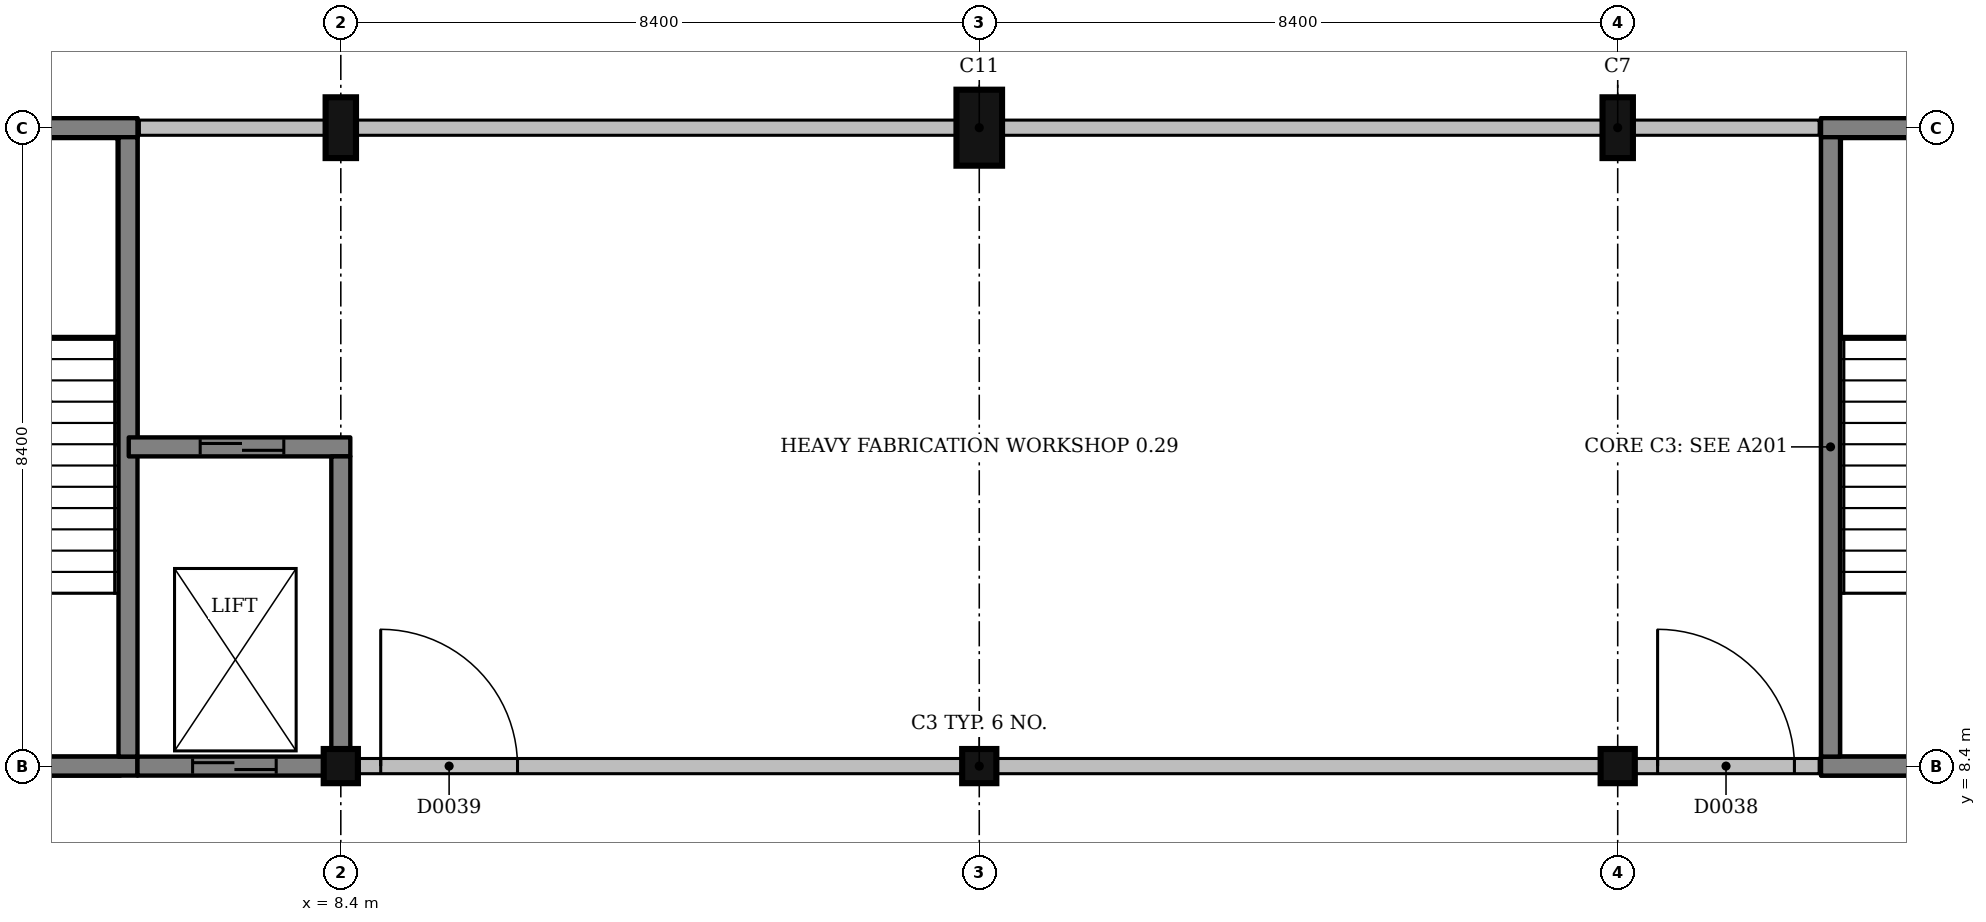
"""IFC4 building model, lengths in metres.
Left out: names, types, materials, properties, quantities, classifications, styles, units other than length and angle.
Written with IfcOpenShell. Run it as: python <this file> out.ifc"""

import sys

from ifc_helpers import new_model, si_unit, direction, frame, frame_2d, origin, origin_2d, place, context, subcontext, project, spatial, rectangle, extrude, element, fill, save


model = new_model("IFC4")
c1 = context("Model", 3, precision=1e-05, world=origin(), true_north=direction((0.0, 1.0)))
c2 = subcontext(c1, "Body", "Model", "MODEL_VIEW")
j1 = project(units=[si_unit("LENGTHUNIT", "METRE"), si_unit("PLANEANGLEUNIT", "RADIAN")], contexts=[c1])
p1 = place(None, origin())
s1 = spatial("IfcSite", under=j1, at=p1, CompositionType="ELEMENT")
p2 = place(p1, origin())
s2 = spatial("IfcBuilding", under=s1, at=p2, CompositionType="ELEMENT")
p3 = place(p2, origin())
s3 = spatial("IfcBuildingStorey", under=s2, at=p3, CompositionType="ELEMENT", Elevation=0.0)
p4 = place(p3, frame((8.4, 8.4, -1.5), z_axis=(0.0, 0.0, 1.0), x_axis=(1.0, 0.0, 0.0)))
e1 = element("IfcColumn", 1, at=p4, inside=s3, PredefinedType="COLUMN", context=c2, shape_type="SweptSolid", body=[
    extrude(rectangle(XDim=0.45, YDim=0.45, at=origin_2d()), origin(), (0.0, 0.0, 1.0), 6.0),
])
p5 = place(p3, frame((8.4, 16.8, -1.5), z_axis=(0.0, 0.0, 1.0), x_axis=(1.0, 0.0, 0.0)))
e2 = element("IfcColumn", 2, at=p5, inside=s3, PredefinedType="COLUMN", context=c2, shape_type="SweptSolid", body=[
    extrude(rectangle(XDim=0.4, YDim=0.8, at=origin_2d()), origin(), (0.0, 0.0, 1.0), 6.0),
])
p6 = place(p3, frame((16.8, 8.4, -1.5), z_axis=(0.0, 0.0, 1.0), x_axis=(1.0, 0.0, 0.0)))
e3 = element("IfcColumn", 3, at=p6, inside=s3, PredefinedType="COLUMN", context=c2, shape_type="SweptSolid", body=[
    extrude(rectangle(XDim=0.45, YDim=0.45, at=origin_2d()), origin(), (0.0, 0.0, 1.0), 6.0),
])
p7 = place(p3, frame((16.8, 16.8, -1.5), z_axis=(0.0, 0.0, 1.0), x_axis=(1.0, 0.0, 0.0)))
e4 = element("IfcColumn", 4, at=p7, inside=s3, PredefinedType="COLUMN", context=c2, shape_type="SweptSolid", body=[
    extrude(rectangle(XDim=0.6, YDim=1.0, at=origin_2d()), origin(), (0.0, 0.0, 1.0), 6.0),
])
p8 = place(p3, frame((25.2, 8.4, -1.5), z_axis=(0.0, 0.0, 1.0), x_axis=(1.0, 0.0, 0.0)))
e5 = element("IfcColumn", 5, at=p8, inside=s3, PredefinedType="COLUMN", context=c2, shape_type="SweptSolid", body=[
    extrude(rectangle(XDim=0.45, YDim=0.45, at=origin_2d()), origin(), (0.0, 0.0, 1.0), 6.0),
])
p9 = place(p3, frame((25.2, 16.8, -1.5), z_axis=(0.0, 0.0, 1.0), x_axis=(1.0, 0.0, 0.0)))
e6 = element("IfcColumn", 6, at=p9, inside=s3, PredefinedType="COLUMN", context=c2, shape_type="SweptSolid", body=[
    extrude(rectangle(XDim=0.4, YDim=0.8, at=origin_2d()), origin(), (0.0, 0.0, 1.0), 6.0),
])
p10 = place(p3, frame((5.5, 8.4, 0.0), z_axis=(0.0, 0.0, 1.0), x_axis=(1.0, 0.0, 0.0)))
e7 = element("IfcWall", 7, at=p10, inside=s3, PredefinedType="SHEAR", context=c2, shape_type="SweptSolid", body=[
    extrude(rectangle(XDim=2.675, YDim=0.2, at=frame_2d((1.337, 0.0))), origin(), (0.0, 0.0, 1.0), 4.5),
])
p11 = place(p10, frame((0.95, 0.0, 0.0)))
e8 = element("IfcOpeningElement", 8, at=p11, cuts=e7, PredefinedType="OPENING", context=c2, shape_type="SweptSolid", body=[
    extrude(rectangle(XDim=1.1, YDim=2.1, at=frame_2d((0.55, 1.05))), frame((0.0, 0.11, 0.0), z_axis=(0.0, -1.0, 0.0), x_axis=(1.0, 0.0, 0.0)), (0.0, 0.0, 1.0), 0.22),
])
p12 = place(p3, frame((5.5, 12.6, 0.0), z_axis=(0.0, 0.0, 1.0), x_axis=(1.0, 0.0, 0.0)))
e9 = element("IfcWall", 9, at=p12, inside=s3, PredefinedType="SHEAR", context=c2, shape_type="SweptSolid", body=[
    extrude(rectangle(XDim=3.0, YDim=0.2, at=frame_2d((1.5, 0.0))), origin(), (0.0, 0.0, 1.0), 4.5),
])
p13 = place(p12, frame((1.05, 0.0, 0.0)))
e10 = element("IfcOpeningElement", 10, at=p13, cuts=e9, PredefinedType="OPENING", context=c2, shape_type="SweptSolid", body=[
    extrude(rectangle(XDim=1.1, YDim=2.1, at=frame_2d((0.55, 1.05))), frame((0.0, 0.11, 0.0), z_axis=(0.0, -1.0, 0.0), x_axis=(1.0, 0.0, 0.0)), (0.0, 0.0, 1.0), 0.22),
])
p14 = place(p3, frame((5.6, 8.5, 0.0), z_axis=(0.0, 0.0, 1.0), x_axis=(0.0, 1.0, 0.0)))
e11 = element("IfcWall", 11, at=p14, inside=s3, PredefinedType="SHEAR", context=c2, shape_type="SweptSolid", body=[
    extrude(rectangle(XDim=4.0, YDim=0.2, at=frame_2d((2.0, 0.0))), origin(), (0.0, 0.0, 1.0), 4.5),
])
p15 = place(p3, frame((8.4, 8.625, 0.0), z_axis=(0.0, 0.0, 1.0), x_axis=(0.0, 1.0, 0.0)))
e12 = element("IfcWall", 12, at=p15, inside=s3, PredefinedType="SHEAR", context=c2, shape_type="SweptSolid", body=[
    extrude(rectangle(XDim=3.875, YDim=0.2, at=frame_2d((1.938, 0.0))), origin(), (0.0, 0.0, 1.0), 4.5),
])
p16 = place(p3, frame((0.2, 8.4, 0.0), z_axis=(0.0, 0.0, 1.0), x_axis=(1.0, 0.0, 0.0)))
e13 = element("IfcWall", 13, at=p16, inside=s3, PredefinedType="SHEAR", context=c2, shape_type="SweptSolid", body=[
    extrude(rectangle(XDim=5.3, YDim=0.25, at=frame_2d((2.65, 0.0))), origin(), (0.0, 0.0, 1.0), 4.5),
])
p17 = place(p16, frame((2.125, 0.0, 0.0)))
e14 = element("IfcOpeningElement", 14, at=p17, cuts=e13, PredefinedType="OPENING", context=c2, shape_type="SweptSolid", body=[
    extrude(rectangle(XDim=1.0, YDim=2.1, at=frame_2d((0.5, 1.05))), frame((0.0, 0.135, 0.0), z_axis=(0.0, -1.0, 0.0), x_axis=(1.0, 0.0, 0.0)), (0.0, 0.0, 1.0), 0.27),
])
p18 = place(p3, frame((0.3, 16.8, 0.0), z_axis=(0.0, 0.0, 1.0), x_axis=(1.0, 0.0, 0.0)))
e15 = element("IfcWall", 15, at=p18, inside=s3, PredefinedType="SHEAR", context=c2, shape_type="SweptSolid", body=[
    extrude(rectangle(XDim=5.425, YDim=0.25, at=frame_2d((2.712, 0.0))), origin(), (0.0, 0.0, 1.0), 4.5),
])
p19 = place(p3, frame((5.6, 12.61, 0.0), z_axis=(0.0, 0.0, 1.0), x_axis=(0.0, 1.0, 0.0)))
e16 = element("IfcWall", 16, at=p19, inside=s3, PredefinedType="SHEAR", context=c2, shape_type="SweptSolid", body=[
    extrude(rectangle(XDim=4.065, YDim=0.25, at=frame_2d((2.032, 0.0))), origin(), (0.0, 0.0, 1.0), 4.5),
])
p20 = place(p3, frame((27.875, 8.4, 0.0), z_axis=(0.0, 0.0, 1.0), x_axis=(1.0, 0.0, 0.0)))
e17 = element("IfcWall", 17, at=p20, inside=s3, PredefinedType="SHEAR", context=c2, shape_type="SweptSolid", body=[
    extrude(rectangle(XDim=5.5, YDim=0.25, at=frame_2d((2.75, 0.0))), origin(), (0.0, 0.0, 1.0), 4.5),
])
p21 = place(p20, frame((2.45, 0.0, 0.0)))
e18 = element("IfcOpeningElement", 18, at=p21, cuts=e17, PredefinedType="OPENING", context=c2, shape_type="SweptSolid", body=[
    extrude(rectangle(XDim=1.0, YDim=2.1, at=frame_2d((0.5, 1.05))), frame((0.0, 0.135, 0.0), z_axis=(0.0, -1.0, 0.0), x_axis=(1.0, 0.0, 0.0)), (0.0, 0.0, 1.0), 0.27),
])
p22 = place(p3, frame((27.875, 16.8, 0.0), z_axis=(0.0, 0.0, 1.0), x_axis=(1.0, 0.0, 0.0)))
e19 = element("IfcWall", 19, at=p22, inside=s3, PredefinedType="SHEAR", context=c2, shape_type="SweptSolid", body=[
    extrude(rectangle(XDim=5.425, YDim=0.25, at=frame_2d((2.712, 0.0))), origin(), (0.0, 0.0, 1.0), 4.5),
])
p23 = place(p3, frame((28.0, 8.525, 0.0), z_axis=(0.0, 0.0, 1.0), x_axis=(0.0, 1.0, 0.0)))
e20 = element("IfcWall", 20, at=p23, inside=s3, PredefinedType="SHEAR", context=c2, shape_type="SweptSolid", body=[
    extrude(rectangle(XDim=8.15, YDim=0.25, at=frame_2d((4.075, 0.0))), origin(), (0.0, 0.0, 1.0), 4.5),
])
for number, where, z_axis, x_axis in (
    (21, (-0.125, 8.4, -1.5), (0.0, 0.0, 1.0), (1.0, 0.0, 0.0)),
    (22, (-0.125, 16.8, -1.5), (0.0, 0.0, 1.0), (1.0, 0.0, 0.0)),
):
    element("IfcWall", number, at=place(p3, frame(where, z_axis=z_axis, x_axis=x_axis)), inside=s3, PredefinedType="SHEAR", context=c2, shape_type="SweptSolid", body=[
        extrude(rectangle(XDim=5.85, YDim=0.25, at=frame_2d((2.925, 0.0))), origin(), (0.0, 0.0, 1.0), 1.5),
    ])
p24 = place(p3, frame((5.6, 8.525, -1.5), z_axis=(0.0, 0.0, 1.0), x_axis=(0.0, 1.0, 0.0)))
e23 = element("IfcWall", 23, at=p24, inside=s3, PredefinedType="SHEAR", context=c2, shape_type="SweptSolid", body=[
    extrude(rectangle(XDim=8.15, YDim=0.25, at=frame_2d((4.075, 0.0))), origin(), (0.0, 0.0, 1.0), 1.5),
])
for number, where, z_axis, x_axis in (
    (24, (27.875, 8.4, -1.5), (0.0, 0.0, 1.0), (1.0, 0.0, 0.0)),
    (25, (27.875, 16.8, -1.5), (0.0, 0.0, 1.0), (1.0, 0.0, 0.0)),
):
    element("IfcWall", number, at=place(p3, frame(where, z_axis=z_axis, x_axis=x_axis)), inside=s3, PredefinedType="SHEAR", context=c2, shape_type="SweptSolid", body=[
        extrude(rectangle(XDim=5.85, YDim=0.25, at=frame_2d((2.925, 0.0))), origin(), (0.0, 0.0, 1.0), 1.5),
    ])
p25 = place(p3, frame((28.0, 8.525, -1.5), z_axis=(0.0, 0.0, 1.0), x_axis=(0.0, 1.0, 0.0)))
e26 = element("IfcWall", 26, at=p25, inside=s3, PredefinedType="SHEAR", context=c2, shape_type="SweptSolid", body=[
    extrude(rectangle(XDim=8.15, YDim=0.25, at=frame_2d((4.075, 0.0))), origin(), (0.0, 0.0, 1.0), 1.5),
])
p26 = place(p3, frame((5.725, 8.4, -1.5), z_axis=(0.0, 0.0, 1.0), x_axis=(1.0, 0.0, 0.0)))
e27 = element("IfcWall", 27, at=p26, inside=s3, PredefinedType="SHEAR", context=c2, shape_type="SweptSolid", body=[
    extrude(rectangle(XDim=2.8, YDim=0.25, at=frame_2d((1.4, 0.0))), origin(), (0.0, 0.0, 1.0), 1.5),
])
p27 = place(p3, frame((5.61, 12.6, -1.5), z_axis=(0.0, 0.0, 1.0), x_axis=(1.0, 0.0, 0.0)))
e28 = element("IfcWall", 28, at=p27, inside=s3, PredefinedType="SHEAR", context=c2, shape_type="SweptSolid", body=[
    extrude(rectangle(XDim=2.915, YDim=0.25, at=frame_2d((1.458, 0.0))), origin(), (0.0, 0.0, 1.0), 1.5),
])
p28 = place(p3, frame((8.4, 8.525, -1.5), z_axis=(0.0, 0.0, 1.0), x_axis=(0.0, 1.0, 0.0)))
e29 = element("IfcWall", 29, at=p28, inside=s3, PredefinedType="SHEAR", context=c2, shape_type="SweptSolid", body=[
    extrude(rectangle(XDim=3.95, YDim=0.25, at=frame_2d((1.975, 0.0))), origin(), (0.0, 0.0, 1.0), 1.5),
])
p29 = place(p3, frame((8.625, 8.4, 0.0), z_axis=(0.0, 0.0, 1.0), x_axis=(1.0, 0.0, 0.0)))
e30 = element("IfcWall", 30, at=p29, inside=s3, PredefinedType="PARTITIONING", context=c2, shape_type="SweptSolid", body=[
    extrude(rectangle(XDim=7.95, YDim=0.2, at=frame_2d((3.975, 0.0))), origin(), (0.0, 0.0, 1.0), 3.5),
])
p30 = place(p29, frame((0.3, 0.0, 0.0)))
e31 = element("IfcOpeningElement", 31, at=p30, cuts=e30, PredefinedType="OPENING", context=c2, shape_type="SweptSolid", body=[
    extrude(rectangle(XDim=1.8, YDim=2.1, at=frame_2d((0.9, 1.05))), frame((0.0, 0.11, 0.0), z_axis=(0.0, -1.0, 0.0), x_axis=(1.0, 0.0, 0.0)), (0.0, 0.0, 1.0), 0.22),
])
p31 = place(p3, frame((17.025, 8.4, 0.0), z_axis=(0.0, 0.0, 1.0), x_axis=(1.0, 0.0, 0.0)))
e32 = element("IfcWall", 32, at=p31, inside=s3, PredefinedType="PARTITIONING", context=c2, shape_type="SweptSolid", body=[
    extrude(rectangle(XDim=7.95, YDim=0.2, at=frame_2d((3.975, 0.0))), origin(), (0.0, 0.0, 1.0), 3.5),
])
p32 = place(p3, frame((25.425, 8.4, 0.0), z_axis=(0.0, 0.0, 1.0), x_axis=(1.0, 0.0, 0.0)))
e33 = element("IfcWall", 33, at=p32, inside=s3, PredefinedType="PARTITIONING", context=c2, shape_type="SweptSolid", body=[
    extrude(rectangle(XDim=2.425, YDim=0.2, at=frame_2d((1.212, 0.0))), origin(), (0.0, 0.0, 1.0), 3.6),
])
p33 = place(p32, frame((0.3, 0.0, 0.0)))
e34 = element("IfcOpeningElement", 34, at=p33, cuts=e33, PredefinedType="OPENING", context=c2, shape_type="SweptSolid", body=[
    extrude(rectangle(XDim=1.8, YDim=2.1, at=frame_2d((0.9, 1.05))), frame((0.0, 0.11, 0.0), z_axis=(0.0, -1.0, 0.0), x_axis=(1.0, 0.0, 0.0)), (0.0, 0.0, 1.0), 0.22),
])
p34 = place(p3, frame((5.75, 16.8, 0.0), z_axis=(0.0, 0.0, 1.0), x_axis=(1.0, 0.0, 0.0)))
e35 = element("IfcWall", 35, at=p34, inside=s3, PredefinedType="PARTITIONING", context=c2, shape_type="SweptSolid", body=[
    extrude(rectangle(XDim=2.45, YDim=0.2, at=frame_2d((1.225, 0.0))), origin(), (0.0, 0.0, 1.0), 3.45),
])
for number, where, z_axis, x_axis in (
    (36, (8.6, 16.8, 0.0), (0.0, 0.0, 1.0), (1.0, 0.0, 0.0)),
    (37, (17.1, 16.8, 0.0), (0.0, 0.0, 1.0), (1.0, 0.0, 0.0)),
):
    element("IfcWall", number, at=place(p3, frame(where, z_axis=z_axis, x_axis=x_axis)), inside=s3, PredefinedType="PARTITIONING", context=c2, shape_type="SweptSolid", body=[
        extrude(rectangle(XDim=7.9, YDim=0.2, at=frame_2d((3.95, 0.0))), origin(), (0.0, 0.0, 1.0), 3.45),
    ])
p35 = place(p3, frame((25.4, 16.8, 0.0), z_axis=(0.0, 0.0, 1.0), x_axis=(1.0, 0.0, 0.0)))
e38 = element("IfcWall", 38, at=p35, inside=s3, PredefinedType="PARTITIONING", context=c2, shape_type="SweptSolid", body=[
    extrude(rectangle(XDim=2.45, YDim=0.2, at=frame_2d((1.225, 0.0))), origin(), (0.0, 0.0, 1.0), 3.45),
])
p36 = place(p33, origin())
e39 = element("IfcDoor", 39, at=p36, inside=s3, OperationType="DOUBLE_DOOR_SINGLE_SWING", PredefinedType="DOOR", context=c2, shape_type="SweptSolid", body=[
    extrude(rectangle(XDim=1.8, YDim=2.1, at=frame_2d((0.9, 1.05))), frame((0.0, 0.025, 0.0), z_axis=(0.0, -1.0, 0.0), x_axis=(1.0, 0.0, 0.0)), (0.0, 0.0, 1.0), 0.05),
])
fill(e34, e39)
p37 = place(p30, origin())
e40 = element("IfcDoor", 40, at=p37, inside=s3, OperationType="DOUBLE_DOOR_SINGLE_SWING", PredefinedType="DOOR", context=c2, shape_type="SweptSolid", body=[
    extrude(rectangle(XDim=1.8, YDim=2.1, at=frame_2d((0.9, 1.05))), frame((0.0, 0.025, 0.0), z_axis=(0.0, -1.0, 0.0), x_axis=(1.0, 0.0, 0.0)), (0.0, 0.0, 1.0), 0.05),
])
fill(e31, e40)
p38 = place(p11, origin())
e41 = element("IfcDoor", 41, at=p38, inside=s3, OperationType="SLIDING_TO_RIGHT", PredefinedType="DOOR", context=c2, shape_type="SweptSolid", body=[
    extrude(rectangle(XDim=1.1, YDim=2.1, at=frame_2d((0.55, 1.05))), frame((0.0, 0.025, 0.0), z_axis=(0.0, -1.0, 0.0), x_axis=(1.0, 0.0, 0.0)), (0.0, 0.0, 1.0), 0.05),
])
fill(e8, e41)
p39 = place(p13, origin())
e42 = element("IfcDoor", 42, at=p39, inside=s3, OperationType="SLIDING_TO_LEFT", PredefinedType="DOOR", context=c2, shape_type="SweptSolid", body=[
    extrude(rectangle(XDim=1.1, YDim=2.1, at=frame_2d((0.55, 1.05))), frame((0.0, 0.025, 0.0), z_axis=(0.0, -1.0, 0.0), x_axis=(1.0, 0.0, 0.0)), (0.0, 0.0, 1.0), 0.05),
])
fill(e10, e42)
save(model, sys.argv[1])
